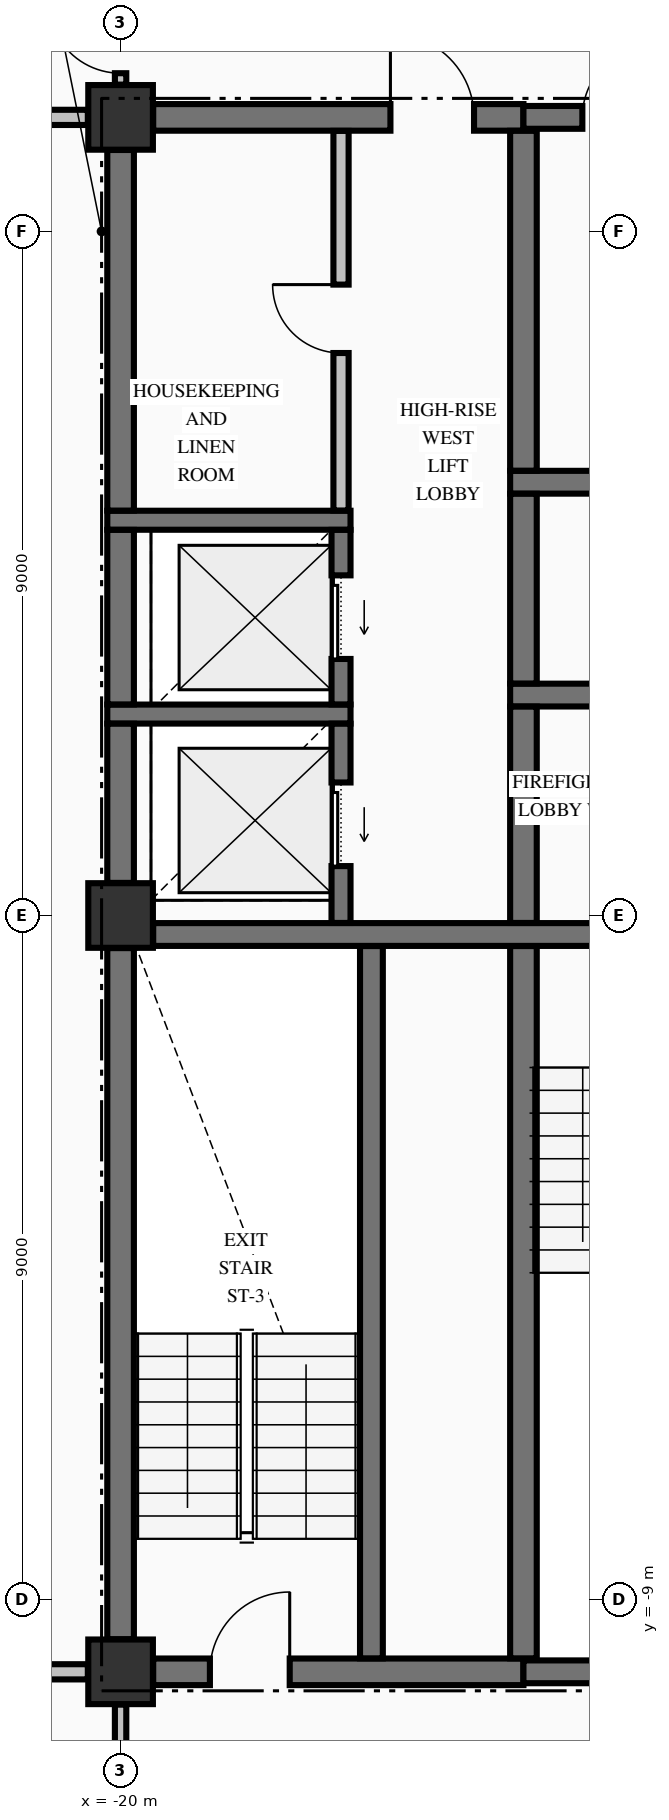
"""IFC4 building model, lengths in metres.
Left out: names, types, materials, properties, quantities, classifications, styles, units other than length and angle.
Written with IfcOpenShell. Run it as: python <this file> out.ifc"""

import sys

from ifc_helpers import new_model, si_unit, direction, frame, frame_2d, origin, origin_2d, place, context, subcontext, project, spatial, rectangle, extrude, element, fill, save


model = new_model("IFC4")
c1 = context("Model", 3, precision=1e-05, world=origin(), true_north=direction((0.0, 1.0)))
c2 = subcontext(c1, "Body", "Model", "MODEL_VIEW")
j1 = project(units=[si_unit("LENGTHUNIT", "METRE"), si_unit("PLANEANGLEUNIT", "RADIAN")], contexts=[c1])
p1 = place(None, origin())
s1 = spatial("IfcSite", under=j1, at=p1, CompositionType="ELEMENT")
p2 = place(p1, origin())
s2 = spatial("IfcBuilding", under=s1, at=p2, CompositionType="ELEMENT")
p3 = place(p2, frame((0.0, 0.0, 194.86)))
s3 = spatial("IfcBuildingStorey", under=s2, at=p3, CompositionType="ELEMENT", Elevation=194.86)
for number, where, z_axis, x_axis in (
    (1, (-20.0, -9.95, -0.275), (0.0, 0.0, 1.0), (1.0, 0.0, 0.0)),
    (2, (-20.0, 10.5, -0.275), (0.0, 0.0, 1.0), (1.0, 0.0, 0.0)),
    (3, (-20.0, 0.0, -0.275), (0.0, 0.0, 1.0), (1.0, 0.0, 0.0)),
):
    element("IfcColumn", number, at=place(p3, frame(where, z_axis=z_axis, x_axis=x_axis)), inside=s3, PredefinedType="COLUMN", context=c2, shape_type="SweptSolid", body=[
        extrude(rectangle(XDim=0.85, YDim=0.85, at=origin_2d()), origin(), (0.0, 0.0, 1.0), 3.425),
    ])
p4 = place(p3, frame((-19.571, -9.95, 0.0), z_axis=(0.0, 0.0, 1.0), x_axis=(1.0, 0.0, 0.0)))
e4 = element("IfcWall", 4, at=p4, inside=s3, PredefinedType="SHEAR", context=c2, shape_type="SweptSolid", body=[
    extrude(rectangle(XDim=4.871, YDim=0.35, at=frame_2d((2.436, 0.0))), origin(), (0.0, 0.0, 1.0), 3.15),
])
p5 = place(p4, frame((0.746, 0.0, 0.0)))
e5 = element("IfcOpeningElement", 5, at=p5, cuts=e4, PredefinedType="OPENING", context=c2, shape_type="SweptSolid", body=[
    extrude(rectangle(XDim=1.05, YDim=2.15, at=frame_2d((0.525, 1.075))), frame((0.0, 0.185, 0.0), z_axis=(0.0, -1.0, 0.0), x_axis=(1.0, 0.0, 0.0)), (0.0, 0.0, 1.0), 0.37),
])
p6 = place(p3, frame((-14.7, -9.95, 0.0), z_axis=(0.0, 0.0, 1.0), x_axis=(1.0, 0.0, 0.0)))
e6 = element("IfcWall", 6, at=p6, inside=s3, PredefinedType="SHEAR", context=c2, shape_type="SweptSolid", body=[
    extrude(rectangle(XDim=3.271, YDim=0.3, at=frame_2d((1.635, 0.0))), origin(), (0.0, 0.0, 1.0), 3.15),
])
p7 = place(p3, frame((-19.571, -0.25, 0.0), z_axis=(0.0, 0.0, 1.0), x_axis=(1.0, 0.0, 0.0)))
e7 = element("IfcWall", 7, at=p7, inside=s3, PredefinedType="SHEAR", context=c2, shape_type="SweptSolid", body=[
    extrude(rectangle(XDim=8.142, YDim=0.3, at=frame_2d((4.071, 0.0))), origin(), (0.0, 0.0, 1.0), 3.15),
])
p8 = place(p7, frame((5.871, 0.0, 0.0)))
e8 = element("IfcOpeningElement", 8, at=p8, cuts=e7, PredefinedType="OPENING", context=c2, shape_type="SweptSolid", body=[
    extrude(rectangle(XDim=1.1, YDim=2.15, at=frame_2d((0.55, 1.075))), frame((0.0, 0.16, 0.0), z_axis=(0.0, -1.0, 0.0), x_axis=(1.0, 0.0, 0.0)), (0.0, 0.0, 1.0), 0.32),
])
p9 = place(p3, frame((-20.175, 2.65, 0.0), z_axis=(0.0, 0.0, 1.0), x_axis=(1.0, 0.0, 0.0)))
e9 = element("IfcWall", 9, at=p9, inside=s3, PredefinedType="SOLIDWALL", context=c2, shape_type="SweptSolid", body=[
    extrude(rectangle(XDim=3.2, YDim=0.25, at=frame_2d((1.6, 0.0))), origin(), (0.0, 0.0, 1.0), 3.15),
])
p10 = place(p3, frame((-14.875, 2.9, 0.0), z_axis=(0.0, 0.0, 1.0), x_axis=(1.0, 0.0, 0.0)))
e10 = element("IfcWall", 10, at=p10, inside=s3, PredefinedType="SHEAR", context=c2, shape_type="SweptSolid", body=[
    extrude(rectangle(XDim=4.025, YDim=0.3, at=frame_2d((2.012, 0.0))), origin(), (0.0, 0.0, 1.0), 3.15),
])
p11 = place(p10, frame((2.075, 0.0, 0.0)))
e11 = element("IfcOpeningElement", 11, at=p11, cuts=e10, PredefinedType="OPENING", context=c2, shape_type="SweptSolid", body=[
    extrude(rectangle(XDim=1.1, YDim=2.2, at=frame_2d((0.55, 1.1))), frame((0.0, 0.16, 0.0), z_axis=(0.0, -1.0, 0.0), x_axis=(1.0, 0.0, 0.0)), (0.0, 0.0, 1.0), 0.32),
])
p12 = place(p3, frame((-20.175, 5.2, 0.0), z_axis=(0.0, 0.0, 1.0), x_axis=(1.0, 0.0, 0.0)))
e12 = element("IfcWall", 12, at=p12, inside=s3, PredefinedType="SOLIDWALL", context=c2, shape_type="SweptSolid", body=[
    extrude(rectangle(XDim=3.2, YDim=0.25, at=frame_2d((1.6, 0.0))), origin(), (0.0, 0.0, 1.0), 3.15),
])
p13 = place(p3, frame((-14.875, 5.7, 0.0), z_axis=(0.0, 0.0, 1.0), x_axis=(1.0, 0.0, 0.0)))
e13 = element("IfcWall", 13, at=p13, inside=s3, PredefinedType="SHEAR", context=c2, shape_type="SweptSolid", body=[
    extrude(rectangle(XDim=4.025, YDim=0.3, at=frame_2d((2.012, 0.0))), origin(), (0.0, 0.0, 1.0), 3.15),
])
p14 = place(p3, frame((-19.571, 10.5, 0.0), z_axis=(0.0, 0.0, 1.0), x_axis=(1.0, 0.0, 0.0)))
e14 = element("IfcWall", 14, at=p14, inside=s3, PredefinedType="SHEAR", context=c2, shape_type="SweptSolid", body=[
    extrude(rectangle(XDim=4.871, YDim=0.35, at=frame_2d((2.436, 0.0))), origin(), (0.0, 0.0, 1.0), 3.15),
])
p15 = place(p14, frame((3.121, 0.0, 0.0)))
e15 = element("IfcOpeningElement", 15, at=p15, cuts=e14, PredefinedType="OPENING", context=c2, shape_type="SweptSolid", body=[
    extrude(rectangle(XDim=1.1, YDim=2.15, at=frame_2d((0.55, 1.075))), frame((0.0, 0.185, 0.0), z_axis=(0.0, -1.0, 0.0), x_axis=(1.0, 0.0, 0.0)), (0.0, 0.0, 1.0), 0.37),
])
p16 = place(p3, frame((-14.7, 10.5, 0.0), z_axis=(0.0, 0.0, 1.0), x_axis=(1.0, 0.0, 0.0)))
e16 = element("IfcWall", 16, at=p16, inside=s3, PredefinedType="SHEAR", context=c2, shape_type="SweptSolid", body=[
    extrude(rectangle(XDim=3.271, YDim=0.3, at=frame_2d((1.635, 0.0))), origin(), (0.0, 0.0, 1.0), 3.15),
])
p17 = place(p16, frame((0.775, 0.0, 0.0)))
e17 = element("IfcOpeningElement", 17, at=p17, cuts=e16, PredefinedType="OPENING", context=c2, shape_type="SweptSolid", body=[
    extrude(rectangle(XDim=0.95, YDim=2.15, at=frame_2d((0.475, 1.075))), frame((0.0, 0.16, 0.0), z_axis=(0.0, -1.0, 0.0), x_axis=(1.0, 0.0, 0.0)), (0.0, 0.0, 1.0), 0.32),
])
p18 = place(p3, frame((-26.835, -9.95, 0.0), z_axis=(0.0, 0.0, 1.0), x_axis=(1.0, 0.0, 0.0)))
e18 = element("IfcWall", 18, at=p18, inside=s3, PredefinedType="PARTITIONING", context=c2, shape_type="SweptSolid", body=[
    extrude(rectangle(XDim=6.404, YDim=0.2, at=frame_2d((3.202, 0.0))), origin(), (0.0, 0.0, 1.0), 3.15),
])
p19 = place(p3, frame((-26.835, 10.5, 0.0), z_axis=(0.0, 0.0, 1.0), x_axis=(1.0, 0.0, 0.0)))
e19 = element("IfcWall", 19, at=p19, inside=s3, PredefinedType="PARTITIONING", context=c2, shape_type="SweptSolid", body=[
    extrude(rectangle(XDim=6.404, YDim=0.2, at=frame_2d((3.202, 0.0))), origin(), (0.0, 0.0, 1.0), 3.15),
])
p20 = place(p19, frame((2.86, 0.0, 0.0)))
e20 = element("IfcOpeningElement", 20, at=p20, cuts=e19, PredefinedType="OPENING", context=c2, shape_type="SweptSolid", body=[
    extrude(rectangle(XDim=0.95, YDim=2.15, at=frame_2d((0.475, 1.075))), frame((0.0, 0.11, 0.0), z_axis=(0.0, -1.0, 0.0), x_axis=(1.0, 0.0, 0.0)), (0.0, 0.0, 1.0), 0.22),
])
p21 = place(p3, frame((-20.0, -9.521, 0.0), z_axis=(0.0, 0.0, 1.0), x_axis=(0.0, 1.0, 0.0)))
e21 = element("IfcWall", 21, at=p21, inside=s3, PredefinedType="SHEAR", context=c2, shape_type="SweptSolid", body=[
    extrude(rectangle(XDim=9.092, YDim=0.35, at=frame_2d((4.546, 0.0))), origin(), (0.0, 0.0, 1.0), 3.15),
])
p22 = place(p3, frame((-20.0, 0.429, 0.0), z_axis=(0.0, 0.0, 1.0), x_axis=(0.0, 1.0, 0.0)))
e22 = element("IfcWall", 22, at=p22, inside=s3, PredefinedType="SHEAR", context=c2, shape_type="SweptSolid", body=[
    extrude(rectangle(XDim=2.094, YDim=0.35, at=frame_2d((1.047, 0.0))), origin(), (0.0, 0.0, 1.0), 3.15),
])
p23 = place(p3, frame((-20.0, 2.777, 0.0), z_axis=(0.0, 0.0, 1.0), x_axis=(0.0, 1.0, 0.0)))
e23 = element("IfcWall", 23, at=p23, inside=s3, PredefinedType="SHEAR", context=c2, shape_type="SweptSolid", body=[
    extrude(rectangle(XDim=2.296, YDim=0.35, at=frame_2d((1.148, 0.0))), origin(), (0.0, 0.0, 1.0), 3.15),
])
p24 = place(p3, frame((-20.0, 5.327, 0.0), z_axis=(0.0, 0.0, 1.0), x_axis=(0.0, 1.0, 0.0)))
e24 = element("IfcWall", 24, at=p24, inside=s3, PredefinedType="SHEAR", context=c2, shape_type="SweptSolid", body=[
    extrude(rectangle(XDim=4.744, YDim=0.35, at=frame_2d((2.372, 0.0))), origin(), (0.0, 0.0, 1.0), 3.15),
])
p25 = place(p3, frame((-17.1, -0.098, 0.0), z_axis=(0.0, 0.0, 1.0), x_axis=(0.0, 1.0, 0.0)))
e25 = element("IfcWall", 25, at=p25, inside=s3, PredefinedType="SOLIDWALL", context=c2, shape_type="SweptSolid", body=[
    extrude(rectangle(XDim=2.621, YDim=0.25, at=frame_2d((1.311, 0.0))), origin(), (0.0, 0.0, 1.0), 3.15),
])
p26 = place(p25, frame((0.748, 0.0, 0.0)))
e26 = element("IfcOpeningElement", 26, at=p26, cuts=e25, PredefinedType="OPENING", context=c2, shape_type="SweptSolid", body=[
    extrude(rectangle(XDim=1.1, YDim=2.2, at=frame_2d((0.55, 1.1))), frame((0.0, 0.135, 0.0), z_axis=(0.0, -1.0, 0.0), x_axis=(1.0, 0.0, 0.0)), (0.0, 0.0, 1.0), 0.27),
])
p27 = place(p3, frame((-17.1, 2.777, 0.0), z_axis=(0.0, 0.0, 1.0), x_axis=(0.0, 1.0, 0.0)))
e27 = element("IfcWall", 27, at=p27, inside=s3, PredefinedType="SOLIDWALL", context=c2, shape_type="SweptSolid", body=[
    extrude(rectangle(XDim=2.296, YDim=0.25, at=frame_2d((1.148, 0.0))), origin(), (0.0, 0.0, 1.0), 3.15),
])
p28 = place(p27, frame((0.598, 0.0, 0.0)))
e28 = element("IfcOpeningElement", 28, at=p28, cuts=e27, PredefinedType="OPENING", context=c2, shape_type="SweptSolid", body=[
    extrude(rectangle(XDim=1.1, YDim=2.2, at=frame_2d((0.55, 1.1))), frame((0.0, 0.135, 0.0), z_axis=(0.0, -1.0, 0.0), x_axis=(1.0, 0.0, 0.0)), (0.0, 0.0, 1.0), 0.27),
])
p29 = place(p3, frame((-16.7, -9.773, 0.0), z_axis=(0.0, 0.0, 1.0), x_axis=(0.0, 1.0, 0.0)))
e29 = element("IfcWall", 29, at=p29, inside=s3, PredefinedType="SHEAR", context=c2, shape_type="SweptSolid", body=[
    extrude(rectangle(XDim=9.371, YDim=0.3, at=frame_2d((4.686, 0.0))), origin(), (0.0, 0.0, 1.0), 3.15),
])
p30 = place(p3, frame((-14.7, -9.773, 0.0), z_axis=(0.0, 0.0, 1.0), x_axis=(0.0, 1.0, 0.0)))
e30 = element("IfcWall", 30, at=p30, inside=s3, PredefinedType="SHEAR", context=c2, shape_type="SweptSolid", body=[
    extrude(rectangle(XDim=9.371, YDim=0.35, at=frame_2d((4.686, 0.0))), origin(), (0.0, 0.0, 1.0), 3.15),
])
p31 = place(p3, frame((-14.7, -0.098, 0.0), z_axis=(0.0, 0.0, 1.0), x_axis=(0.0, 1.0, 0.0)))
e31 = element("IfcWall", 31, at=p31, inside=s3, PredefinedType="SHEAR", context=c2, shape_type="SweptSolid", body=[
    extrude(rectangle(XDim=2.846, YDim=0.35, at=frame_2d((1.423, 0.0))), origin(), (0.0, 0.0, 1.0), 3.15),
])
p32 = place(p3, frame((-14.7, 3.052, 0.0), z_axis=(0.0, 0.0, 1.0), x_axis=(0.0, 1.0, 0.0)))
e32 = element("IfcWall", 32, at=p32, inside=s3, PredefinedType="SHEAR", context=c2, shape_type="SweptSolid", body=[
    extrude(rectangle(XDim=2.496, YDim=0.35, at=frame_2d((1.248, 0.0))), origin(), (0.0, 0.0, 1.0), 3.15),
])
p33 = place(p3, frame((-14.7, 5.852, 0.0), z_axis=(0.0, 0.0, 1.0), x_axis=(0.0, 1.0, 0.0)))
e33 = element("IfcWall", 33, at=p33, inside=s3, PredefinedType="SHEAR", context=c2, shape_type="SweptSolid", body=[
    extrude(rectangle(XDim=4.471, YDim=0.35, at=frame_2d((2.235, 0.0))), origin(), (0.0, 0.0, 1.0), 3.15),
])
p34 = place(p3, frame((-20.0, -12.097, 0.0), z_axis=(0.0, 0.0, 1.0), x_axis=(0.0, 1.0, 0.0)))
e34 = element("IfcWall", 34, at=p34, inside=s3, PredefinedType="PARTITIONING", context=c2, shape_type="SweptSolid", body=[
    extrude(rectangle(XDim=1.716, YDim=0.15, at=frame_2d((0.858, 0.0))), origin(), (0.0, 0.0, 1.0), 2.342),
])
p35 = place(p3, frame((-20.0, 10.931, 0.0), z_axis=(0.0, 0.0, 1.0), x_axis=(0.0, 1.0, 0.0)))
e35 = element("IfcWall", 35, at=p35, inside=s3, PredefinedType="PARTITIONING", context=c2, shape_type="SweptSolid", body=[
    extrude(rectangle(XDim=1.516, YDim=0.15, at=frame_2d((0.758, 0.0))), origin(), (0.0, 0.0, 1.0), 2.342),
])
p36 = place(p35, frame((0.15, 0.0, 0.0)))
e36 = element("IfcOpeningElement", 36, at=p36, cuts=e35, PredefinedType="OPENING", context=c2, shape_type="SweptSolid", body=[
    extrude(rectangle(XDim=0.95, YDim=2.15, at=frame_2d((0.475, 1.075))), frame((0.0, 0.085, 0.0), z_axis=(0.0, -1.0, 0.0), x_axis=(1.0, 0.0, 0.0)), (0.0, 0.0, 1.0), 0.17),
])
p37 = place(p3, frame((-17.1, 5.328, 0.0), z_axis=(0.0, 0.0, 1.0), x_axis=(0.0, 1.0, 0.0)))
e37 = element("IfcWall", 37, at=p37, inside=s3, PredefinedType="PARTITIONING", context=c2, shape_type="SweptSolid", body=[
    extrude(rectangle(XDim=4.994, YDim=0.2, at=frame_2d((2.497, 0.0))), origin(), (0.0, 0.0, 1.0), 3.15),
])
p38 = place(p37, frame((2.072, 0.0, 0.0)))
e38 = element("IfcOpeningElement", 38, at=p38, cuts=e37, PredefinedType="OPENING", context=c2, shape_type="SweptSolid", body=[
    extrude(rectangle(XDim=0.9, YDim=2.15, at=frame_2d((0.45, 1.075))), frame((0.0, 0.11, 0.0), z_axis=(0.0, -1.0, 0.0), x_axis=(1.0, 0.0, 0.0)), (0.0, 0.0, 1.0), 0.22),
])
p39 = place(p17, origin())
e39 = element("IfcDoor", 39, at=p39, inside=s3, OperationType="SINGLE_SWING_RIGHT", PredefinedType="DOOR", context=c2, shape_type="SweptSolid", body=[
    extrude(rectangle(XDim=0.95, YDim=2.15, at=frame_2d((0.475, 1.075))), frame((0.0, 0.025, 0.0), z_axis=(0.0, -1.0, 0.0), x_axis=(1.0, 0.0, 0.0)), (0.0, 0.0, 1.0), 0.05),
])
fill(e17, e39)
p40 = place(p5, origin())
e40 = element("IfcDoor", 40, at=p40, inside=s3, OperationType="SINGLE_SWING_RIGHT", PredefinedType="DOOR", context=c2, shape_type="SweptSolid", body=[
    extrude(rectangle(XDim=1.05, YDim=2.15, at=frame_2d((0.525, 1.075))), frame((0.0, 0.025, 0.0), z_axis=(0.0, -1.0, 0.0), x_axis=(1.0, 0.0, 0.0)), (0.0, 0.0, 1.0), 0.05),
])
fill(e5, e40)
p41 = place(p26, origin())
e41 = element("IfcDoor", 41, at=p41, inside=s3, OperationType="SLIDING_TO_LEFT", PredefinedType="DOOR", context=c2, shape_type="SweptSolid", body=[
    extrude(rectangle(XDim=1.1, YDim=2.2, at=frame_2d((0.55, 1.1))), frame((0.0, 0.025, 0.0), z_axis=(0.0, -1.0, 0.0), x_axis=(1.0, 0.0, 0.0)), (0.0, 0.0, 1.0), 0.05),
])
fill(e26, e41)
p42 = place(p28, origin())
e42 = element("IfcDoor", 42, at=p42, inside=s3, OperationType="SLIDING_TO_LEFT", PredefinedType="DOOR", context=c2, shape_type="SweptSolid", body=[
    extrude(rectangle(XDim=1.1, YDim=2.2, at=frame_2d((0.55, 1.1))), frame((0.0, 0.025, 0.0), z_axis=(0.0, -1.0, 0.0), x_axis=(1.0, 0.0, 0.0)), (0.0, 0.0, 1.0), 0.05),
])
fill(e28, e42)
p43 = place(p15, origin())
e43 = element("IfcDoor", 43, at=p43, inside=s3, OperationType="SINGLE_SWING_LEFT", PredefinedType="DOOR", context=c2, shape_type="SweptSolid", body=[
    extrude(rectangle(XDim=1.1, YDim=2.15, at=frame_2d((0.55, 1.075))), frame((0.0, 0.025, 0.0), z_axis=(0.0, -1.0, 0.0), x_axis=(1.0, 0.0, 0.0)), (0.0, 0.0, 1.0), 0.05),
])
fill(e15, e43)
p44 = place(p38, origin())
e44 = element("IfcDoor", 44, at=p44, inside=s3, OperationType="SINGLE_SWING_RIGHT", PredefinedType="DOOR", context=c2, shape_type="SweptSolid", body=[
    extrude(rectangle(XDim=0.9, YDim=2.15, at=frame_2d((0.45, 1.075))), frame((0.0, 0.025, 0.0), z_axis=(0.0, -1.0, 0.0), x_axis=(1.0, 0.0, 0.0)), (0.0, 0.0, 1.0), 0.05),
])
fill(e38, e44)
p45 = place(p36, origin())
e45 = element("IfcDoor", 45, at=p45, inside=s3, OperationType="SINGLE_SWING_RIGHT", PredefinedType="DOOR", context=c2, shape_type="SweptSolid", body=[
    extrude(rectangle(XDim=0.95, YDim=2.15, at=frame_2d((0.475, 1.075))), frame((0.0, 0.025, 0.0), z_axis=(0.0, -1.0, 0.0), x_axis=(1.0, 0.0, 0.0)), (0.0, 0.0, 1.0), 0.05),
])
fill(e36, e45)
save(model, sys.argv[1])
